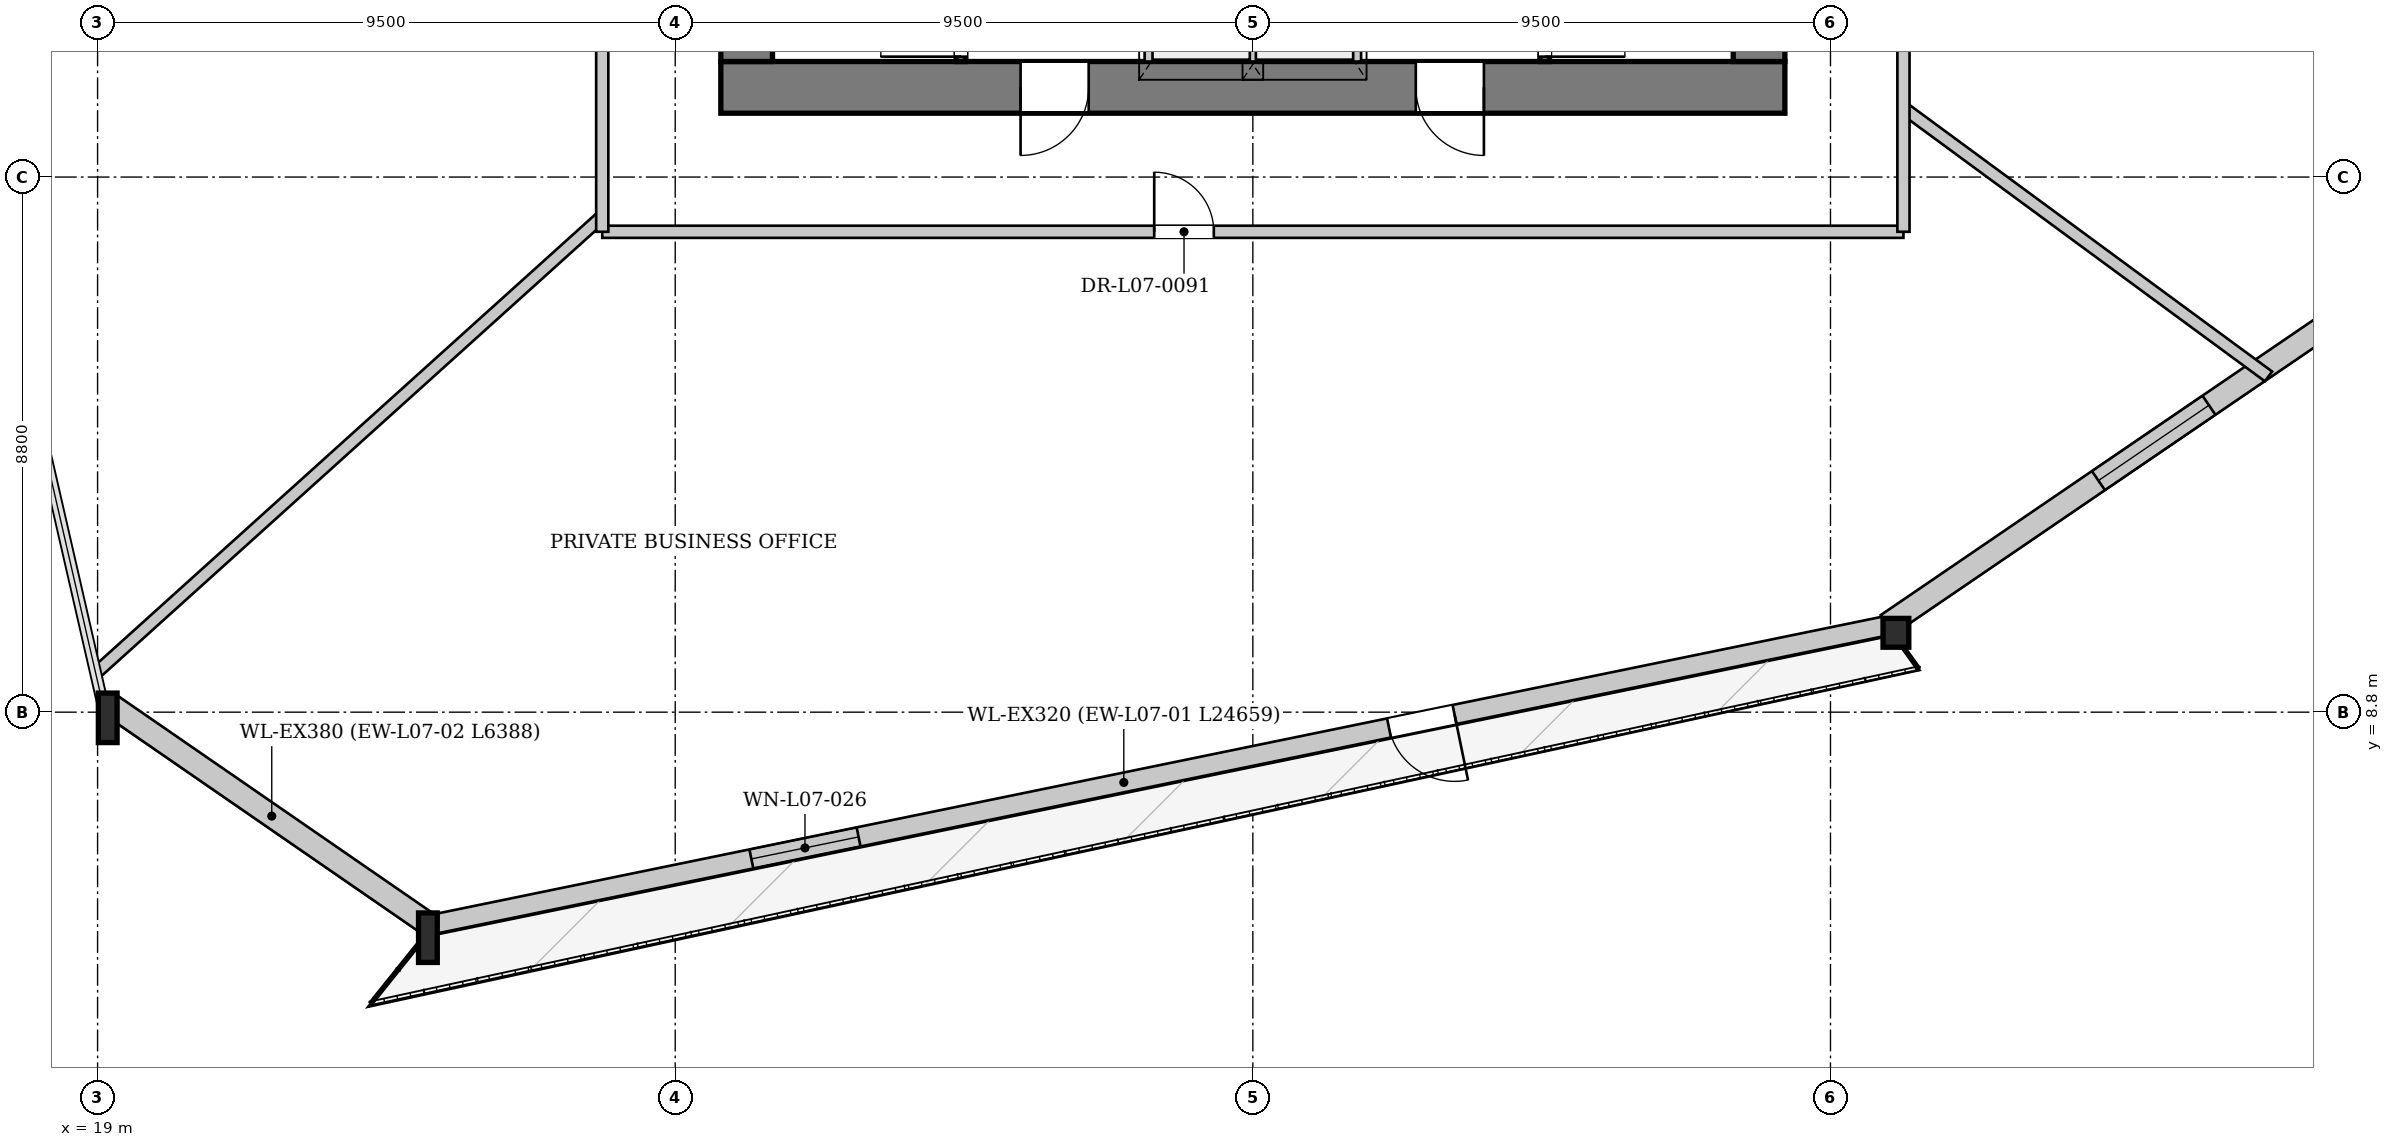
"""IFC4 building model, lengths in metres.
Left out: names, types, materials, properties, quantities, classifications, styles, units other than length and angle.
Written with IfcOpenShell. Run it as: python <this file> out.ifc"""

import sys

from ifc_helpers import new_model, si_unit, direction, frame, frame_2d, origin, origin_2d, place, context, subcontext, project, spatial, rectangle, i_section, extrude, source, transform, mapped, element, fill, save


model = new_model("IFC4")
c1 = context("Model", 3, precision=1e-05, world=origin(), true_north=direction((0.0, 1.0)))
c2 = subcontext(c1, "Body", "Model", "MODEL_VIEW")
j1 = project(units=[si_unit("LENGTHUNIT", "METRE"), si_unit("PLANEANGLEUNIT", "RADIAN")], contexts=[c1])
p1 = place(None, origin())
s1 = spatial("IfcSite", under=j1, at=p1, CompositionType="ELEMENT")
p2 = place(p1, origin())
s2 = spatial("IfcBuilding", under=s1, at=p2, CompositionType="ELEMENT")
p3 = place(p2, frame((0.0, 0.0, 32.85)))
s3 = spatial("IfcBuildingStorey", under=s2, at=p3, CompositionType="ELEMENT", Elevation=32.85)
m1 = source(origin(), c2, "Body", "SweptSolid", [
    extrude(i_section(OverallWidth=0.308, OverallDepth=0.814, WebThickness=0.021, FlangeThickness=0.04, at=origin_2d()), origin(), (0.0, 0.0, 1.0), 3.387),
])
p4 = place(p3, frame((19.128, 8.748, 0.0), z_axis=(0.023066743612, -0.024292164366, 0.999438750544), x_axis=(0.72516058756, 0.688579786408, 0.0)))
e1 = element("IfcColumn", 1, at=p4, inside=s3, PredefinedType="COLUMN", context=c2, shape_type="MappedRepresentation", body=[
    mapped(m1, transform((0.0, 0.0, 0.0), x_axis=(1.0, 0.0, 0.0), y_axis=(0.0, 1.0, 0.0), z_axis=(0.0, 0.0, 1.0), scale=1.0)),
])
m2 = source(origin(), c2, "Body", "SweptSolid", [
    extrude(i_section(OverallWidth=0.308, OverallDepth=0.814, WebThickness=0.021, FlangeThickness=0.04, at=origin_2d()), origin(), (0.0, 0.0, 1.0), 3.387),
])
p5 = place(p3, frame((24.386, 5.121, 0.0), z_axis=(0.027680772948, -0.017516739131, 0.99946332532), x_axis=(0.534737926699, 0.845017958241, 0.0)))
e2 = element("IfcColumn", 2, at=p5, inside=s3, PredefinedType="COLUMN", context=c2, shape_type="MappedRepresentation", body=[
    mapped(m2, transform((0.0, 0.0, 0.0), x_axis=(1.0, 0.0, 0.0), y_axis=(0.0, 1.0, 0.0), z_axis=(0.0, 0.0, 1.0), scale=1.0)),
])
m3 = source(origin(), c2, "Body", "SweptSolid", [
    extrude(i_section(OverallWidth=0.424, OverallDepth=0.474, WebThickness=0.043, FlangeThickness=0.068, at=origin_2d()), origin(), (0.0, 0.0, 1.0), 3.386),
])
p6 = place(p3, frame((48.54, 10.082, 0.0), z_axis=(0.021269785384, 0.013699183807, 0.999679913069), x_axis=(-0.541477579908, 0.840715189857, 0.0)))
e3 = element("IfcColumn", 3, at=p6, inside=s3, PredefinedType="COLUMN", context=c2, shape_type="MappedRepresentation", body=[
    mapped(m3, transform((0.0, 0.0, 0.0), x_axis=(1.0, 0.0, 0.0), y_axis=(0.0, 1.0, 0.0), z_axis=(0.0, 0.0, 1.0), scale=1.0)),
])
p7 = place(p3, frame((48.508, 10.239, 0.0), z_axis=(0.0, 0.0, 1.0), x_axis=(-0.979551146508, -0.201195306543, 0.0)))
e4 = element("IfcWall", 4, at=p7, inside=s3, PredefinedType="SOLIDWALL", context=c2, shape_type="SweptSolid", body=[
    extrude(rectangle(XDim=24.658, YDim=0.32, at=frame_2d((12.329, 0.0))), origin(), (0.0, 0.0, 1.0), 2.592),
])
p8 = place(p7, frame((7.341, 0.0, 0.0)))
e5 = element("IfcOpeningElement", 5, at=p8, cuts=e4, PredefinedType="OPENING", context=c2, shape_type="SweptSolid", body=[
    extrude(rectangle(XDim=1.1, YDim=2.3, at=frame_2d((0.55, 1.15))), frame((0.0, 0.17, 0.0), z_axis=(0.0, -1.0, 0.0), x_axis=(1.0, 0.0, 0.0)), (0.0, 0.0, 1.0), 0.34),
])
p9 = place(p7, frame((17.347, 0.0, 0.272)))
e6 = element("IfcOpeningElement", 6, at=p9, cuts=e4, PredefinedType="OPENING", context=c2, shape_type="SweptSolid", body=[
    extrude(rectangle(XDim=1.8, YDim=2.2, at=frame_2d((0.9, 1.1))), frame((0.0, 0.17, 0.0), z_axis=(0.0, -1.0, 0.0), x_axis=(1.0, 0.0, 0.0)), (0.0, 0.0, 1.0), 0.34),
])
p10 = place(p3, frame((24.494, 5.277, 0.0), z_axis=(0.0, 0.0, 1.0), x_axis=(-0.823143176909, 0.567833875625, 0.0)))
e7 = element("IfcWall", 7, at=p10, inside=s3, PredefinedType="SOLIDWALL", context=c2, shape_type="SweptSolid", body=[
    extrude(rectangle(XDim=6.388, YDim=0.38, at=frame_2d((3.194, 0.0))), origin(), (0.0, 0.0, 1.0), 2.592),
])
p11 = place(p3, frame((68.805, 24.132, 0.0), z_axis=(0.0, 0.0, 1.0), x_axis=(-0.826173505972, -0.563415777229, 0.0)))
e8 = element("IfcWall", 8, at=p11, inside=s3, PredefinedType="SOLIDWALL", context=c2, shape_type="SweptSolid", body=[
    extrude(rectangle(XDim=24.659, YDim=0.38, at=frame_2d((12.329, 0.0))), origin(), (0.0, 0.0, 1.0), 2.592),
])
p12 = place(p11, frame((5.804, 0.0, 0.222)))
e9 = element("IfcOpeningElement", 9, at=p12, cuts=e8, PredefinedType="OPENING", context=c2, shape_type="SweptSolid", body=[
    extrude(rectangle(XDim=2.2, YDim=2.25, at=frame_2d((1.1, 1.125))), frame((0.0, 0.2, 0.0), z_axis=(0.0, -1.0, 0.0), x_axis=(1.0, 0.0, 0.0)), (0.0, 0.0, 1.0), 0.4),
])
p13 = place(p11, frame((18.254, 0.0, 0.222)))
e10 = element("IfcOpeningElement", 10, at=p13, cuts=e8, PredefinedType="OPENING", context=c2, shape_type="SweptSolid", body=[
    extrude(rectangle(XDim=2.2, YDim=2.25, at=frame_2d((1.1, 1.125))), frame((0.0, 0.2, 0.0), z_axis=(0.0, -1.0, 0.0), x_axis=(1.0, 0.0, 0.0)), (0.0, 0.0, 1.0), 0.4),
])
p14 = place(p3, frame((46.75, 19.075, 0.0), z_axis=(0.0, 0.0, 1.0), x_axis=(-1.0, 0.0, 0.0)))
e11 = element("IfcWall", 11, at=p14, inside=s3, PredefinedType="SHEAR", context=c2, shape_type="SweptSolid", body=[
    extrude(rectangle(XDim=17.5, YDim=0.85, at=frame_2d((8.75, 0.0))), origin(), (0.0, 0.0, 1.0), 3.3),
])
p15 = place(p14, frame((4.95, 0.0, 0.0)))
e12 = element("IfcOpeningElement", 12, at=p15, cuts=e11, PredefinedType="OPENING", context=c2, shape_type="SweptSolid", body=[
    extrude(rectangle(XDim=1.12, YDim=2.25, at=frame_2d((0.56, 1.125))), frame((0.0, 0.435, 0.0), z_axis=(0.0, -1.0, 0.0), x_axis=(1.0, 0.0, 0.0)), (0.0, 0.0, 1.0), 0.87),
])
p16 = place(p14, frame((11.45, 0.0, 0.0)))
e13 = element("IfcOpeningElement", 13, at=p16, cuts=e11, PredefinedType="OPENING", context=c2, shape_type="SweptSolid", body=[
    extrude(rectangle(XDim=1.12, YDim=2.25, at=frame_2d((0.56, 1.125))), frame((0.0, 0.435, 0.0), z_axis=(0.0, -1.0, 0.0), x_axis=(1.0, 0.0, 0.0)), (0.0, 0.0, 1.0), 0.87),
])
p17 = place(p3, frame((29.675, 19.5, 0.0), z_axis=(0.0, 0.0, 1.0), x_axis=(0.0, 1.0, 0.0)))
e14 = element("IfcWall", 14, at=p17, inside=s3, PredefinedType="SHEAR", context=c2, shape_type="SweptSolid", body=[
    extrude(rectangle(XDim=14.2, YDim=0.85, at=frame_2d((7.1, 0.0))), origin(), (0.0, 0.0, 1.0), 3.3),
])
p18 = place(p17, frame((7.42, 0.0, 0.0)))
e15 = element("IfcOpeningElement", 15, at=p18, cuts=e14, PredefinedType="OPENING", context=c2, shape_type="SweptSolid", body=[
    extrude(rectangle(XDim=1.6, YDim=2.2, at=frame_2d((0.8, 1.1))), frame((0.0, 0.435, 0.0), z_axis=(0.0, -1.0, 0.0), x_axis=(1.0, 0.0, 0.0)), (0.0, 0.0, 1.0), 0.87),
])
p19 = place(p3, frame((46.325, 33.7, 0.0), z_axis=(0.0, 0.0, 1.0), x_axis=(0.0, -1.0, 0.0)))
e16 = element("IfcWall", 16, at=p19, inside=s3, PredefinedType="SHEAR", context=c2, shape_type="SweptSolid", body=[
    extrude(rectangle(XDim=14.2, YDim=0.85, at=frame_2d((7.1, 0.0))), origin(), (0.0, 0.0, 1.0), 3.3),
])
p20 = place(p19, frame((5.18, 0.0, 0.0)))
e17 = element("IfcOpeningElement", 17, at=p20, cuts=e16, PredefinedType="OPENING", context=c2, shape_type="SweptSolid", body=[
    extrude(rectangle(XDim=1.6, YDim=2.2, at=frame_2d((0.8, 1.1))), frame((0.0, 0.435, 0.0), z_axis=(0.0, -1.0, 0.0), x_axis=(1.0, 0.0, 0.0)), (0.0, 0.0, 1.0), 0.87),
])
p21 = place(p3, frame((33.2, 19.5, 0.0), z_axis=(0.0, 0.0, 1.0), x_axis=(0.0, 1.0, 0.0)))
e18 = element("IfcWall", 18, at=p21, inside=s3, PredefinedType="PARTITIONING", context=c2, shape_type="SweptSolid", body=[
    extrude(rectangle(XDim=7.46, YDim=0.16, at=frame_2d((3.73, 0.0))), origin(), (0.0, 0.0, 1.0), 3.3),
])
p22 = place(p21, frame((0.08, 0.0, 0.0)))
e19 = element("IfcOpeningElement", 19, at=p22, cuts=e18, PredefinedType="OPENING", context=c2, shape_type="SweptSolid", body=[
    extrude(rectangle(XDim=1.32, YDim=2.2, at=frame_2d((0.66, 1.1))), frame((0.0, 0.09, 0.0), z_axis=(0.0, -1.0, 0.0), x_axis=(1.0, 0.0, 0.0)), (0.0, 0.0, 1.0), 0.18),
])
p23 = place(p3, frame((42.8, 26.96, 0.0), z_axis=(0.0, 0.0, 1.0), x_axis=(0.0, -1.0, 0.0)))
e20 = element("IfcWall", 20, at=p23, inside=s3, PredefinedType="PARTITIONING", context=c2, shape_type="SweptSolid", body=[
    extrude(rectangle(XDim=7.46, YDim=0.16, at=frame_2d((3.73, 0.0))), origin(), (0.0, 0.0, 1.0), 3.3),
])
p24 = place(p23, frame((6.06, 0.0, 0.0)))
e21 = element("IfcOpeningElement", 21, at=p24, cuts=e20, PredefinedType="OPENING", context=c2, shape_type="SweptSolid", body=[
    extrude(rectangle(XDim=1.32, YDim=2.2, at=frame_2d((0.66, 1.1))), frame((0.0, 0.09, 0.0), z_axis=(0.0, -1.0, 0.0), x_axis=(1.0, 0.0, 0.0)), (0.0, 0.0, 1.0), 0.18),
])
p25 = place(p3, frame((36.3, 19.5, 0.0), z_axis=(0.0, 0.0, 1.0), x_axis=(0.0, 1.0, 0.0)))
e22 = element("IfcWall", 22, at=p25, inside=s3, PredefinedType="PARTITIONING", context=c2, shape_type="SweptSolid", body=[
    extrude(rectangle(XDim=4.78, YDim=0.16, at=frame_2d((2.39, 0.0))), origin(), (0.0, 0.0, 1.0), 3.3),
])
p26 = place(p25, frame((0.6, 0.0, 0.0)))
e23 = element("IfcOpeningElement", 23, at=p26, cuts=e22, PredefinedType="OPENING", context=c2, shape_type="SweptSolid", body=[
    extrude(rectangle(XDim=1.2, YDim=2.2, at=frame_2d((0.6, 1.1))), frame((0.0, 0.09, 0.0), z_axis=(0.0, -1.0, 0.0), x_axis=(1.0, 0.0, 0.0)), (0.0, 0.0, 1.0), 0.18),
])
p27 = place(p25, frame((2.65, 0.0, 0.0)))
e24 = element("IfcOpeningElement", 24, at=p27, cuts=e22, PredefinedType="OPENING", context=c2, shape_type="SweptSolid", body=[
    extrude(rectangle(XDim=0.95, YDim=2.1, at=frame_2d((0.475, 1.05))), frame((0.0, 0.09, 0.0), z_axis=(0.0, -1.0, 0.0), x_axis=(1.0, 0.0, 0.0)), (0.0, 0.0, 1.0), 0.18),
])
p28 = place(p3, frame((39.7, 24.28, 0.0), z_axis=(0.0, 0.0, 1.0), x_axis=(0.0, -1.0, 0.0)))
e25 = element("IfcWall", 25, at=p28, inside=s3, PredefinedType="PARTITIONING", context=c2, shape_type="SweptSolid", body=[
    extrude(rectangle(XDim=4.78, YDim=0.16, at=frame_2d((2.39, 0.0))), origin(), (0.0, 0.0, 1.0), 3.3),
])
p29 = place(p28, frame((3.12, 0.0, 0.0)))
e26 = element("IfcOpeningElement", 26, at=p29, cuts=e25, PredefinedType="OPENING", context=c2, shape_type="SweptSolid", body=[
    extrude(rectangle(XDim=1.2, YDim=2.2, at=frame_2d((0.6, 1.1))), frame((0.0, 0.09, 0.0), z_axis=(0.0, -1.0, 0.0), x_axis=(1.0, 0.0, 0.0)), (0.0, 0.0, 1.0), 0.18),
])
p30 = place(p3, frame((38.0, 19.5, 0.0), z_axis=(0.0, 0.0, 1.0), x_axis=(0.0, 1.0, 0.0)))
e27 = element("IfcWall", 27, at=p30, inside=s3, PredefinedType="PARTITIONING", context=c2, shape_type="SweptSolid", body=[
    extrude(rectangle(XDim=2.46, YDim=0.125, at=frame_2d((1.23, 0.0))), origin(), (0.0, 0.0, 1.0), 3.3),
])
p31 = place(p3, frame((27.3, 16.954, 0.0), z_axis=(0.0, 0.0, 1.0), x_axis=(-0.742738100956, -0.669582043807, 0.0)))
e28 = element("IfcWall", 28, at=p31, inside=s3, PredefinedType="PARTITIONING", context=c2, shape_type="SweptSolid", body=[
    extrude(rectangle(XDim=11.183, YDim=0.2, at=frame_2d((5.592, 0.0))), origin(), (0.0, 0.0, 1.0), 3.3),
])
p32 = place(p3, frame((48.7, 18.735, 0.0), z_axis=(0.0, 0.0, 1.0), x_axis=(0.805734708508, -0.592276607258, 0.0)))
e29 = element("IfcWall", 29, at=p32, inside=s3, PredefinedType="PARTITIONING", context=c2, shape_type="SweptSolid", body=[
    extrude(rectangle(XDim=7.451, YDim=0.2, at=frame_2d((3.726, 0.0))), origin(), (0.0, 0.0, 1.0), 3.3),
])
p33 = place(p3, frame((27.3, 16.7, 0.0), z_axis=(0.0, 0.0, 1.0), x_axis=(1.0, 0.0, 0.0)))
e30 = element("IfcWall", 30, at=p33, inside=s3, PredefinedType="PARTITIONING", context=c2, shape_type="SweptSolid", body=[
    extrude(rectangle(XDim=21.4, YDim=0.2, at=frame_2d((10.7, 0.0))), origin(), (0.0, 0.0, 1.0), 3.3),
])
p34 = place(p33, frame((9.078, 0.0, 0.0)))
e31 = element("IfcOpeningElement", 31, at=p34, cuts=e30, PredefinedType="OPENING", context=c2, shape_type="SweptSolid", body=[
    extrude(rectangle(XDim=0.98, YDim=2.15, at=frame_2d((0.49, 1.075))), frame((0.0, 0.11, 0.0), z_axis=(0.0, -1.0, 0.0), x_axis=(1.0, 0.0, 0.0)), (0.0, 0.0, 1.0), 0.22),
])
p35 = place(p3, frame((27.3, 16.7, 0.0), z_axis=(0.0, 0.0, 1.0), x_axis=(0.0, 1.0, 0.0)))
e32 = element("IfcWall", 32, at=p35, inside=s3, PredefinedType="PARTITIONING", context=c2, shape_type="SweptSolid", body=[
    extrude(rectangle(XDim=19.8, YDim=0.2, at=frame_2d((9.9, 0.0))), origin(), (0.0, 0.0, 1.0), 3.3),
])
p36 = place(p35, frame((18.52, 0.0, 0.0)))
e33 = element("IfcOpeningElement", 33, at=p36, cuts=e32, PredefinedType="OPENING", context=c2, shape_type="SweptSolid", body=[
    extrude(rectangle(XDim=0.98, YDim=2.15, at=frame_2d((0.49, 1.075))), frame((0.0, 0.11, 0.0), z_axis=(0.0, -1.0, 0.0), x_axis=(1.0, 0.0, 0.0)), (0.0, 0.0, 1.0), 0.22),
])
p37 = place(p35, frame((4.702, 0.0, 0.0)))
e34 = element("IfcOpeningElement", 34, at=p37, cuts=e32, PredefinedType="OPENING", context=c2, shape_type="SweptSolid", body=[
    extrude(rectangle(XDim=0.98, YDim=2.15, at=frame_2d((0.49, 1.075))), frame((0.0, 0.11, 0.0), z_axis=(0.0, -1.0, 0.0), x_axis=(1.0, 0.0, 0.0)), (0.0, 0.0, 1.0), 0.22),
])
p38 = place(p3, frame((48.7, 16.7, 0.0), z_axis=(0.0, 0.0, 1.0), x_axis=(0.0, 1.0, 0.0)))
e35 = element("IfcWall", 35, at=p38, inside=s3, PredefinedType="PARTITIONING", context=c2, shape_type="SweptSolid", body=[
    extrude(rectangle(XDim=19.8, YDim=0.2, at=frame_2d((9.9, 0.0))), origin(), (0.0, 0.0, 1.0), 3.3),
])
p39 = place(p38, frame((4.231, 0.0, 0.0)))
e36 = element("IfcOpeningElement", 36, at=p39, cuts=e35, PredefinedType="OPENING", context=c2, shape_type="SweptSolid", body=[
    extrude(rectangle(XDim=0.98, YDim=2.15, at=frame_2d((0.49, 1.075))), frame((0.0, 0.11, 0.0), z_axis=(0.0, -1.0, 0.0), x_axis=(1.0, 0.0, 0.0)), (0.0, 0.0, 1.0), 0.22),
])
m4 = source(origin(), c2, "Body", "SweptSolid", [
    extrude(rectangle(XDim=1.1, YDim=2.3, at=frame_2d((0.55, 1.15))), frame((0.0, 0.025, 0.0), z_axis=(0.0, -1.0, 0.0), x_axis=(1.0, 0.0, 0.0)), (0.0, 0.0, 1.0), 0.05),
])
p40 = place(p8, origin())
e37 = element("IfcDoor", 37, at=p40, inside=s3, OperationType="SINGLE_SWING_LEFT", PredefinedType="DOOR", context=c2, shape_type="MappedRepresentation", body=[
    mapped(m4, transform((0.0, 0.0, 0.0), x_axis=(1.0, 0.0, 0.0), y_axis=(0.0, 1.0, 0.0), z_axis=(0.0, 0.0, 1.0), scale=1.0)),
])
fill(e5, e37)
m5 = source(origin(), c2, "Body", "SweptSolid", [
    extrude(rectangle(XDim=1.8, YDim=2.2, at=frame_2d((0.9, 1.1))), frame((0.0, 0.03, 0.0), z_axis=(0.0, -1.0, 0.0), x_axis=(1.0, 0.0, 0.0)), (0.0, 0.0, 1.0), 0.06),
])
p41 = place(p9, origin())
e38 = element("IfcWindow", 38, at=p41, inside=s3, PartitioningType="SINGLE_PANEL", PredefinedType="WINDOW", context=c2, shape_type="MappedRepresentation", body=[
    mapped(m5, transform((0.0, 0.0, 0.0), x_axis=(1.0, 0.0, 0.0), y_axis=(0.0, 1.0, 0.0), z_axis=(0.0, 0.0, 1.0), scale=1.0)),
])
fill(e6, e38)
m6 = source(origin(), c2, "Body", "SweptSolid", [
    extrude(rectangle(XDim=2.2, YDim=2.25, at=frame_2d((1.1, 1.125))), frame((0.0, 0.03, 0.0), z_axis=(0.0, -1.0, 0.0), x_axis=(1.0, 0.0, 0.0)), (0.0, 0.0, 1.0), 0.06),
])
p42 = place(p13, origin())
e39 = element("IfcWindow", 39, at=p42, inside=s3, PartitioningType="SINGLE_PANEL", PredefinedType="WINDOW", context=c2, shape_type="MappedRepresentation", body=[
    mapped(m6, transform((0.0, 0.0, 0.0), x_axis=(1.0, 0.0, 0.0), y_axis=(0.0, 1.0, 0.0), z_axis=(0.0, 0.0, 1.0), scale=1.0)),
])
fill(e10, e39)
m7 = source(origin(), c2, "Body", "SweptSolid", [
    extrude(rectangle(XDim=1.12, YDim=2.25, at=frame_2d((0.56, 1.125))), frame((0.0, 0.025, 0.0), z_axis=(0.0, -1.0, 0.0), x_axis=(1.0, 0.0, 0.0)), (0.0, 0.0, 1.0), 0.05),
])
p43 = place(p15, origin())
e40 = element("IfcDoor", 40, at=p43, inside=s3, OperationType="SINGLE_SWING_LEFT", PredefinedType="DOOR", context=c2, shape_type="MappedRepresentation", body=[
    mapped(m7, transform((0.0, 0.0, 0.0), x_axis=(1.0, 0.0, 0.0), y_axis=(0.0, 1.0, 0.0), z_axis=(0.0, 0.0, 1.0), scale=1.0)),
])
fill(e12, e40)
p44 = place(p16, origin())
e41 = element("IfcDoor", 41, at=p44, inside=s3, OperationType="SINGLE_SWING_RIGHT", PredefinedType="DOOR", context=c2, shape_type="MappedRepresentation", body=[
    mapped(m7, transform((0.0, 0.0, 0.0), x_axis=(1.0, 0.0, 0.0), y_axis=(0.0, 1.0, 0.0), z_axis=(0.0, 0.0, 1.0), scale=1.0)),
])
fill(e13, e41)
m8 = source(origin(), c2, "Body", "SweptSolid", [
    extrude(rectangle(XDim=1.32, YDim=2.2, at=frame_2d((0.66, 1.1))), frame((0.0, 0.025, 0.0), z_axis=(0.0, -1.0, 0.0), x_axis=(1.0, 0.0, 0.0)), (0.0, 0.0, 1.0), 0.05),
])
p45 = place(p22, origin())
e42 = element("IfcDoor", 42, at=p45, inside=s3, OperationType="SINGLE_SWING_LEFT", PredefinedType="DOOR", context=c2, shape_type="MappedRepresentation", body=[
    mapped(m8, transform((0.0, 0.0, 0.0), x_axis=(1.0, 0.0, 0.0), y_axis=(0.0, 1.0, 0.0), z_axis=(0.0, 0.0, 1.0), scale=1.0)),
])
fill(e19, e42)
p46 = place(p24, origin())
e43 = element("IfcDoor", 43, at=p46, inside=s3, OperationType="SINGLE_SWING_RIGHT", PredefinedType="DOOR", context=c2, shape_type="MappedRepresentation", body=[
    mapped(m8, transform((0.0, 0.0, 0.0), x_axis=(1.0, 0.0, 0.0), y_axis=(0.0, 1.0, 0.0), z_axis=(0.0, 0.0, 1.0), scale=1.0)),
])
fill(e21, e43)
m9 = source(origin(), c2, "Body", "SweptSolid", [
    extrude(rectangle(XDim=0.98, YDim=2.15, at=frame_2d((0.49, 1.075))), frame((0.0, 0.025, 0.0), z_axis=(0.0, -1.0, 0.0), x_axis=(1.0, 0.0, 0.0)), (0.0, 0.0, 1.0), 0.05),
])
p47 = place(p34, origin())
e44 = element("IfcDoor", 44, at=p47, inside=s3, OperationType="SINGLE_SWING_LEFT", PredefinedType="DOOR", context=c2, shape_type="MappedRepresentation", body=[
    mapped(m9, transform((0.0, 0.0, 0.0), x_axis=(1.0, 0.0, 0.0), y_axis=(0.0, 1.0, 0.0), z_axis=(0.0, 0.0, 1.0), scale=1.0)),
])
fill(e31, e44)
save(model, sys.argv[1])
